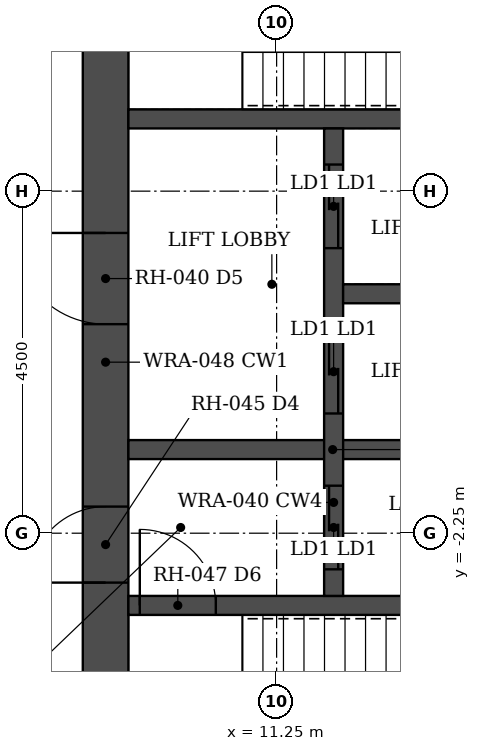
"""IFC4 building model, lengths in metres.
Left out: names, types, materials, properties, quantities, classifications, styles, units other than length and angle.
Written with IfcOpenShell. Run it as: python <this file> out.ifc"""

import sys

from ifc_helpers import new_model, si_unit, direction, frame, frame_2d, origin, place, context, subcontext, project, spatial, rectangle, extrude, element, fill, save


model = new_model("IFC4")
c1 = context("Model", 3, precision=1e-05, world=origin(), true_north=direction((0.0, 1.0)))
c2 = subcontext(c1, "Body", "Model", "MODEL_VIEW")
j1 = project(units=[si_unit("LENGTHUNIT", "METRE"), si_unit("PLANEANGLEUNIT", "RADIAN")], contexts=[c1])
p1 = place(None, origin())
s1 = spatial("IfcSite", under=j1, at=p1, CompositionType="ELEMENT")
p2 = place(p1, origin())
s2 = spatial("IfcBuilding", under=s1, at=p2, CompositionType="ELEMENT")
p3 = place(p2, frame((0.0, 0.0, 100.0)))
s3 = spatial("IfcBuildingStorey", under=s2, at=p3, CompositionType="ELEMENT", Elevation=100.0)
p4 = place(p3, frame((9.0, -6.45, 0.0), z_axis=(0.0, 0.0, 1.0), x_axis=(0.0, 1.0, 0.0)))
e1 = element("IfcWall", 1, at=p4, inside=s3, PredefinedType="SHEAR", context=c2, shape_type="SweptSolid", body=[
    extrude(rectangle(XDim=12.9, YDim=0.6, at=frame_2d((6.45, 0.0))), origin(), (0.0, 0.0, 1.0), 3.5),
])
p5 = place(p4, frame((3.55, 0.0, 0.0)))
e2 = element("IfcOpeningElement", 2, at=p5, cuts=e1, PredefinedType="OPENING", context=c2, shape_type="SweptSolid", body=[
    extrude(rectangle(XDim=1.0, YDim=2.1, at=frame_2d((0.5, 1.05))), frame((0.0, 0.31, 0.0), z_axis=(0.0, -1.0, 0.0), x_axis=(1.0, 0.0, 0.0)), (0.0, 0.0, 1.0), 0.62),
])
p6 = place(p4, frame((6.95, 0.0, 0.0)))
e3 = element("IfcOpeningElement", 3, at=p6, cuts=e1, PredefinedType="OPENING", context=c2, shape_type="SweptSolid", body=[
    extrude(rectangle(XDim=1.2, YDim=2.1, at=frame_2d((0.6, 1.05))), frame((0.0, 0.31, 0.0), z_axis=(0.0, -1.0, 0.0), x_axis=(1.0, 0.0, 0.0)), (0.0, 0.0, 1.0), 0.62),
])
p7 = place(p4, frame((10.85, 0.0, 0.0)))
e4 = element("IfcOpeningElement", 4, at=p7, cuts=e1, PredefinedType="OPENING", context=c2, shape_type="SweptSolid", body=[
    extrude(rectangle(XDim=1.0, YDim=2.1, at=frame_2d((0.5, 1.05))), frame((0.0, 0.31, 0.0), z_axis=(0.0, -1.0, 0.0), x_axis=(1.0, 0.0, 0.0)), (0.0, 0.0, 1.0), 0.62),
])
p8 = place(p3, frame((9.3, -3.2, 0.0), z_axis=(0.0, 0.0, 1.0), x_axis=(1.0, 0.0, 0.0)))
e5 = element("IfcWall", 5, at=p8, inside=s3, PredefinedType="SHEAR", context=c2, shape_type="SweptSolid", body=[
    extrude(rectangle(XDim=8.4, YDim=0.25, at=frame_2d((4.2, 0.0))), origin(), (0.0, 0.0, 1.0), 3.5),
])
p9 = place(p8, frame((0.15, 0.0, 0.0)))
e6 = element("IfcOpeningElement", 6, at=p9, cuts=e5, PredefinedType="OPENING", context=c2, shape_type="SweptSolid", body=[
    extrude(rectangle(XDim=1.0, YDim=2.1, at=frame_2d((0.5, 1.05))), frame((0.0, 0.135, 0.0), z_axis=(0.0, -1.0, 0.0), x_axis=(1.0, 0.0, 0.0)), (0.0, 0.0, 1.0), 0.27),
])
p10 = place(p3, frame((9.3, 3.2, 0.0), z_axis=(0.0, 0.0, 1.0), x_axis=(1.0, 0.0, 0.0)))
e7 = element("IfcWall", 7, at=p10, inside=s3, PredefinedType="SHEAR", context=c2, shape_type="SweptSolid", body=[
    extrude(rectangle(XDim=8.4, YDim=0.25, at=frame_2d((4.2, 0.0))), origin(), (0.0, 0.0, 1.0), 3.5),
])
p11 = place(p3, frame((9.3, -1.15, 0.0), z_axis=(0.0, 0.0, 1.0), x_axis=(1.0, 0.0, 0.0)))
e8 = element("IfcWall", 8, at=p11, inside=s3, PredefinedType="SHEAR", context=c2, shape_type="SweptSolid", body=[
    extrude(rectangle(XDim=5.375, YDim=0.25, at=frame_2d((2.688, 0.0))), origin(), (0.0, 0.0, 1.0), 3.5),
])
p12 = place(p3, frame((12.0, -3.075, 0.0), z_axis=(0.0, 0.0, 1.0), x_axis=(0.0, 1.0, 0.0)))
e9 = element("IfcWall", 9, at=p12, inside=s3, PredefinedType="SHEAR", context=c2, shape_type="SweptSolid", body=[
    extrude(rectangle(XDim=6.15, YDim=0.25, at=frame_2d((3.075, 0.0))), origin(), (0.0, 0.0, 1.0), 3.5),
])
p13 = place(p12, frame((0.35, 0.0, 0.0)))
e10 = element("IfcOpeningElement", 10, at=p13, cuts=e9, PredefinedType="OPENING", context=c2, shape_type="SweptSolid", body=[
    extrude(rectangle(XDim=1.1, YDim=2.1, at=frame_2d((0.55, 1.05))), frame((0.0, 0.135, 0.0), z_axis=(0.0, -1.0, 0.0), x_axis=(1.0, 0.0, 0.0)), (0.0, 0.0, 1.0), 0.27),
])
p14 = place(p12, frame((2.4, 0.0, 0.0)))
e11 = element("IfcOpeningElement", 11, at=p14, cuts=e9, PredefinedType="OPENING", context=c2, shape_type="SweptSolid", body=[
    extrude(rectangle(XDim=1.1, YDim=2.1, at=frame_2d((0.55, 1.05))), frame((0.0, 0.135, 0.0), z_axis=(0.0, -1.0, 0.0), x_axis=(1.0, 0.0, 0.0)), (0.0, 0.0, 1.0), 0.27),
])
p15 = place(p12, frame((4.575, 0.0, 0.0)))
e12 = element("IfcOpeningElement", 12, at=p15, cuts=e9, PredefinedType="OPENING", context=c2, shape_type="SweptSolid", body=[
    extrude(rectangle(XDim=1.1, YDim=2.1, at=frame_2d((0.55, 1.05))), frame((0.0, 0.135, 0.0), z_axis=(0.0, -1.0, 0.0), x_axis=(1.0, 0.0, 0.0)), (0.0, 0.0, 1.0), 0.27),
])
p16 = place(p3, frame((12.125, 0.9, 0.0), z_axis=(0.0, 0.0, 1.0), x_axis=(1.0, 0.0, 0.0)))
e13 = element("IfcWall", 13, at=p16, inside=s3, PredefinedType="SHEAR", context=c2, shape_type="SweptSolid", body=[
    extrude(rectangle(XDim=2.55, YDim=0.25, at=frame_2d((1.275, 0.0))), origin(), (0.0, 0.0, 1.0), 3.5),
])
p17 = place(p5, origin())
e14 = element("IfcDoor", 14, at=p17, inside=s3, OperationType="SINGLE_SWING_LEFT", PredefinedType="DOOR", context=c2, shape_type="SweptSolid", body=[
    extrude(rectangle(XDim=1.0, YDim=2.1, at=frame_2d((0.5, 1.05))), frame((0.0, 0.025, 0.0), z_axis=(0.0, -1.0, 0.0), x_axis=(1.0, 0.0, 0.0)), (0.0, 0.0, 1.0), 0.05),
])
fill(e2, e14)
p18 = place(p9, origin())
e15 = element("IfcDoor", 15, at=p18, inside=s3, OperationType="SINGLE_SWING_LEFT", PredefinedType="DOOR", context=c2, shape_type="SweptSolid", body=[
    extrude(rectangle(XDim=1.0, YDim=2.1, at=frame_2d((0.5, 1.05))), frame((0.0, 0.025, 0.0), z_axis=(0.0, -1.0, 0.0), x_axis=(1.0, 0.0, 0.0)), (0.0, 0.0, 1.0), 0.05),
])
fill(e6, e15)
p19 = place(p6, origin())
e16 = element("IfcDoor", 16, at=p19, inside=s3, OperationType="SINGLE_SWING_RIGHT", PredefinedType="DOOR", context=c2, shape_type="SweptSolid", body=[
    extrude(rectangle(XDim=1.2, YDim=2.1, at=frame_2d((0.6, 1.05))), frame((0.0, 0.025, 0.0), z_axis=(0.0, -1.0, 0.0), x_axis=(1.0, 0.0, 0.0)), (0.0, 0.0, 1.0), 0.05),
])
fill(e3, e16)
p20 = place(p13, origin())
e17 = element("IfcDoor", 17, at=p20, inside=s3, OperationType="DOUBLE_DOOR_SLIDING", PredefinedType="DOOR", context=c2, shape_type="SweptSolid", body=[
    extrude(rectangle(XDim=1.1, YDim=2.1, at=frame_2d((0.55, 1.05))), frame((0.0, 0.025, 0.0), z_axis=(0.0, -1.0, 0.0), x_axis=(1.0, 0.0, 0.0)), (0.0, 0.0, 1.0), 0.05),
])
fill(e10, e17)
p21 = place(p14, origin())
e18 = element("IfcDoor", 18, at=p21, inside=s3, OperationType="DOUBLE_DOOR_SLIDING", PredefinedType="DOOR", context=c2, shape_type="SweptSolid", body=[
    extrude(rectangle(XDim=1.1, YDim=2.1, at=frame_2d((0.55, 1.05))), frame((0.0, 0.025, 0.0), z_axis=(0.0, -1.0, 0.0), x_axis=(1.0, 0.0, 0.0)), (0.0, 0.0, 1.0), 0.05),
])
fill(e11, e18)
p22 = place(p15, origin())
e19 = element("IfcDoor", 19, at=p22, inside=s3, OperationType="DOUBLE_DOOR_SLIDING", PredefinedType="DOOR", context=c2, shape_type="SweptSolid", body=[
    extrude(rectangle(XDim=1.1, YDim=2.1, at=frame_2d((0.55, 1.05))), frame((0.0, 0.025, 0.0), z_axis=(0.0, -1.0, 0.0), x_axis=(1.0, 0.0, 0.0)), (0.0, 0.0, 1.0), 0.05),
])
fill(e12, e19)
save(model, sys.argv[1])
